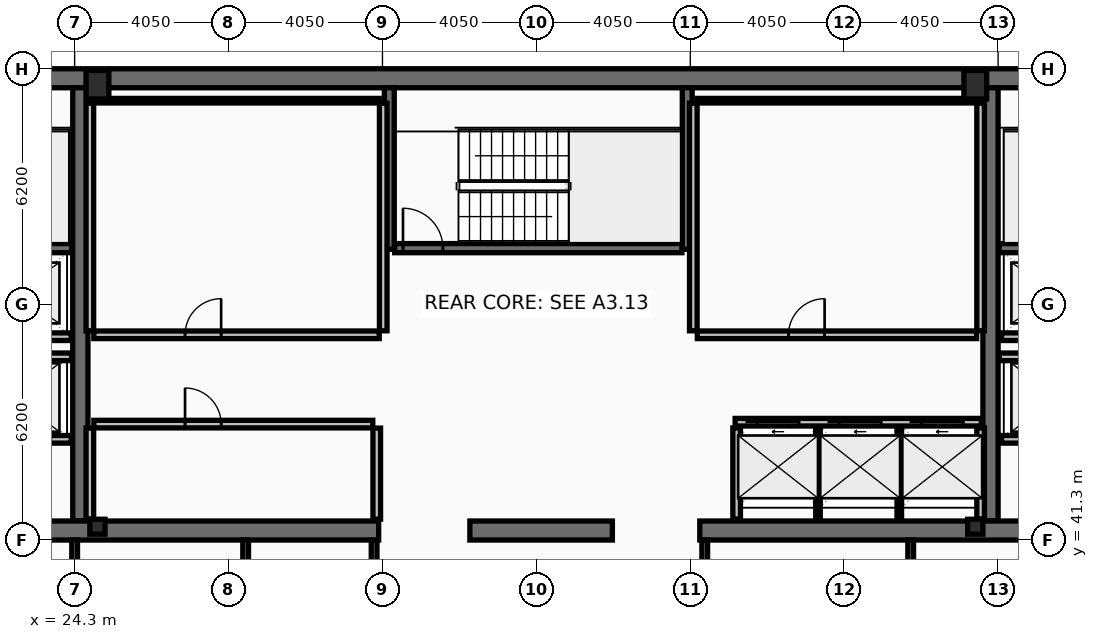
"""IFC4 building model, lengths in metres.
Left out: names, types, materials, properties, quantities, classifications, styles, units other than length and angle.
Written with IfcOpenShell. Run it as: python <this file> out.ifc"""

import sys

from ifc_helpers import new_model, si_unit, direction, frame, frame_2d, origin, origin_2d, place, context, subcontext, project, spatial, rectangle, hollow_rectangle, i_section, extrude, element, fill, save


model = new_model("IFC4")
c1 = context("Model", 3, precision=1e-05, world=origin(), true_north=direction((0.0, 1.0)))
c2 = subcontext(c1, "Body", "Model", "MODEL_VIEW")
j1 = project(units=[si_unit("LENGTHUNIT", "METRE"), si_unit("PLANEANGLEUNIT", "RADIAN")], contexts=[c1])
p1 = place(None, origin())
s1 = spatial("IfcSite", under=j1, at=p1, CompositionType="ELEMENT")
p2 = place(p1, origin())
s2 = spatial("IfcBuilding", under=s1, at=p2, CompositionType="ELEMENT")
p3 = place(p2, frame((0.0, 0.0, 284.2)))
s3 = spatial("IfcBuildingStorey", under=s2, at=p3, CompositionType="ELEMENT", Elevation=284.2)
p4 = place(p3, frame((16.2, 53.45, 0.0), z_axis=(0.0, 0.0, 1.0), x_axis=(1.0, 0.0, 0.0)))
e1 = element("IfcWall", 1, at=p4, inside=s3, PredefinedType="SHEAR", context=c2, shape_type="SweptSolid", body=[
    extrude(rectangle(XDim=40.5, YDim=0.5, at=frame_2d((20.25, 0.0))), origin(), (0.0, 0.0, 1.0), 3.44),
])
for number, where, z_axis, x_axis in (
    (2, (24.45, 41.8, 0.0), (0.0, 0.0, 1.0), (0.0, 1.0, 0.0)),
    (3, (48.4, 41.8, 0.0), (0.0, 0.0, 1.0), (0.0, 1.0, 0.0)),
):
    element("IfcWall", number, at=place(p3, frame(where, z_axis=z_axis, x_axis=x_axis)), inside=s3, PredefinedType="SHEAR", context=c2, shape_type="SweptSolid", body=[
        extrude(rectangle(XDim=11.4, YDim=0.4, at=frame_2d((5.7, 0.0))), origin(), (0.0, 0.0, 1.0), 3.44),
    ])
p5 = place(p3, frame((32.3, 41.55, 0.0), z_axis=(0.0, 0.0, 1.0), x_axis=(-1.0, 0.0, 0.0)))
e4 = element("IfcWall", 4, at=p5, inside=s3, PredefinedType="SHEAR", context=c2, shape_type="SweptSolid", body=[
    extrude(rectangle(XDim=11.45, YDim=0.5, at=frame_2d((5.725, 0.0))), origin(), (0.0, 0.0, 1.0), 3.44),
])
p6 = place(p3, frame((38.45, 41.55, 0.0), z_axis=(0.0, 0.0, 1.0), x_axis=(-1.0, 0.0, 0.0)))
e5 = element("IfcWall", 5, at=p6, inside=s3, PredefinedType="SHEAR", context=c2, shape_type="SweptSolid", body=[
    extrude(rectangle(XDim=3.75, YDim=0.5, at=frame_2d((1.875, 0.0))), origin(), (0.0, 0.0, 1.0), 3.44),
])
p7 = place(p3, frame((52.05, 41.55, 0.0), z_axis=(0.0, 0.0, 1.0), x_axis=(-1.0, 0.0, 0.0)))
e6 = element("IfcWall", 6, at=p7, inside=s3, PredefinedType="SHEAR", context=c2, shape_type="SweptSolid", body=[
    extrude(rectangle(XDim=11.3, YDim=0.5, at=frame_2d((5.65, 0.0))), origin(), (0.0, 0.0, 1.0), 3.44),
])
for number, where, z_axis, x_axis in (
    (7, (32.58, 48.95, 0.0), (0.0, 0.0, 1.0), (0.0, 1.0, 0.0)),
    (8, (40.42, 48.95, 0.0), (0.0, 0.0, 1.0), (0.0, 1.0, 0.0)),
):
    element("IfcWall", number, at=place(p3, frame(where, z_axis=z_axis, x_axis=x_axis)), inside=s3, PredefinedType="SHEAR", context=c2, shape_type="SweptSolid", body=[
        extrude(rectangle(XDim=4.25, YDim=0.26, at=frame_2d((2.125, 0.0))), origin(), (0.0, 0.0, 1.0), 3.44),
    ])
p8 = place(p3, frame((16.7, 48.98, 0.0), z_axis=(0.0, 0.0, 1.0), x_axis=(1.0, 0.0, 0.0)))
e9 = element("IfcWall", 9, at=p8, inside=s3, PredefinedType="SHEAR", context=c2, shape_type="SweptSolid", body=[
    extrude(rectangle(XDim=7.52, YDim=0.24, at=frame_2d((3.76, 0.0))), origin(), (0.0, 0.0, 1.0), 3.44),
])
p9 = place(p8, frame((0.22, 0.0, 0.0)))
e10 = element("IfcOpeningElement", 10, at=p9, cuts=e9, PredefinedType="OPENING", context=c2, shape_type="SweptSolid", body=[
    extrude(rectangle(XDim=1.05, YDim=2.15, at=frame_2d((0.525, 1.075))), frame((0.0, 0.13, 0.0), z_axis=(0.0, -1.0, 0.0), x_axis=(1.0, 0.0, 0.0)), (0.0, 0.0, 1.0), 0.26),
])
p10 = place(p3, frame((48.63, 48.98, 0.0), z_axis=(0.0, 0.0, 1.0), x_axis=(1.0, 0.0, 0.0)))
e11 = element("IfcWall", 11, at=p10, inside=s3, PredefinedType="SHEAR", context=c2, shape_type="SweptSolid", body=[
    extrude(rectangle(XDim=7.57, YDim=0.24, at=frame_2d((3.785, 0.0))), origin(), (0.0, 0.0, 1.0), 3.44),
])
p11 = place(p10, frame((6.3, 0.0, 0.0)))
e12 = element("IfcOpeningElement", 12, at=p11, cuts=e11, PredefinedType="OPENING", context=c2, shape_type="SweptSolid", body=[
    extrude(rectangle(XDim=1.05, YDim=2.15, at=frame_2d((0.525, 1.075))), frame((0.0, 0.13, 0.0), z_axis=(0.0, -1.0, 0.0), x_axis=(1.0, 0.0, 0.0)), (0.0, 0.0, 1.0), 0.26),
])
p12 = place(p3, frame((32.72, 48.98, 0.0), z_axis=(0.0, 0.0, 1.0), x_axis=(1.0, 0.0, 0.0)))
e13 = element("IfcWall", 13, at=p12, inside=s3, PredefinedType="SHEAR", context=c2, shape_type="SweptSolid", body=[
    extrude(rectangle(XDim=7.56, YDim=0.24, at=frame_2d((3.78, 0.0))), origin(), (0.0, 0.0, 1.0), 3.44),
])
p13 = place(p12, frame((0.22, 0.0, 0.0)))
e14 = element("IfcOpeningElement", 14, at=p13, cuts=e13, PredefinedType="OPENING", context=c2, shape_type="SweptSolid", body=[
    extrude(rectangle(XDim=1.05, YDim=2.15, at=frame_2d((0.525, 1.075))), frame((0.0, 0.13, 0.0), z_axis=(0.0, -1.0, 0.0), x_axis=(1.0, 0.0, 0.0)), (0.0, 0.0, 1.0), 0.26),
])
for number, where, z_axis, x_axis in (
    (15, (24.9, 53.28, 0.0), (0.0, 0.0, 1.0), (1.0, 0.0, 0.0)),
    (16, (48.0, 53.28, 0.0), (0.0, 0.0, 1.0), (1.0, 0.0, 0.0)),
):
    element("IfcColumn", number, at=place(p3, frame(where, z_axis=z_axis, x_axis=x_axis)), inside=s3, PredefinedType="COLUMN", context=c2, shape_type="SweptSolid", body=[
        extrude(hollow_rectangle(XDim=0.6, YDim=0.75, WallThickness=0.045, at=origin_2d()), origin(), (0.0, 0.0, 1.0), 3.6),
    ])
for number, where, z_axis, x_axis in (
    (17, (24.9, 41.65, 0.0), (0.0, 0.0, 1.0), (1.0, 0.0, 0.0)),
    (18, (48.0, 41.65, 0.0), (0.0, 0.0, 1.0), (1.0, 0.0, 0.0)),
):
    element("IfcColumn", number, at=place(p3, frame(where, z_axis=z_axis, x_axis=x_axis)), inside=s3, PredefinedType="COLUMN", context=c2, shape_type="SweptSolid", body=[
        extrude(i_section(OverallWidth=0.399, OverallDepth=0.393, WebThickness=0.023, FlangeThickness=0.037, at=origin_2d()), origin(), (0.0, 0.0, 1.0), 3.6),
    ])
p14 = place(p3, frame((41.68, 44.4, 0.0), z_axis=(0.0, 0.0, 1.0), x_axis=(1.0, 0.0, 0.0)))
e19 = element("IfcWall", 19, at=p14, inside=s3, PredefinedType="PARTITIONING", context=c2, shape_type="SweptSolid", body=[
    extrude(rectangle(XDim=6.48, YDim=0.2, at=frame_2d((3.24, 0.0))), origin(), (0.0, 0.0, 1.0), 3.44),
])
p15 = place(p14, frame((0.58, 0.0, 0.0)))
e20 = element("IfcOpeningElement", 20, at=p15, cuts=e19, PredefinedType="OPENING", context=c2, shape_type="SweptSolid", body=[
    extrude(rectangle(XDim=1.1, YDim=2.18, at=frame_2d((0.55, 1.09))), frame((0.0, 0.11, 0.0), z_axis=(0.0, -1.0, 0.0), x_axis=(1.0, 0.0, 0.0)), (0.0, 0.0, 1.0), 0.22),
])
p16 = place(p14, frame((2.74, 0.0, 0.0)))
e21 = element("IfcOpeningElement", 21, at=p16, cuts=e19, PredefinedType="OPENING", context=c2, shape_type="SweptSolid", body=[
    extrude(rectangle(XDim=1.1, YDim=2.18, at=frame_2d((0.55, 1.09))), frame((0.0, 0.11, 0.0), z_axis=(0.0, -1.0, 0.0), x_axis=(1.0, 0.0, 0.0)), (0.0, 0.0, 1.0), 0.22),
])
p17 = place(p14, frame((4.9, 0.0, 0.0)))
e22 = element("IfcOpeningElement", 22, at=p17, cuts=e19, PredefinedType="OPENING", context=c2, shape_type="SweptSolid", body=[
    extrude(rectangle(XDim=1.1, YDim=2.18, at=frame_2d((0.55, 1.09))), frame((0.0, 0.11, 0.0), z_axis=(0.0, -1.0, 0.0), x_axis=(1.0, 0.0, 0.0)), (0.0, 0.0, 1.0), 0.22),
])
p18 = place(p3, frame((51.61, 43.95, 0.0), z_axis=(0.0, 0.0, 1.0), x_axis=(-1.0, 0.0, 0.0)))
e23 = element("IfcWall", 23, at=p18, inside=s3, PredefinedType="PARTITIONING", context=c2, shape_type="SweptSolid", body=[
    extrude(rectangle(XDim=2.92, YDim=0.2, at=frame_2d((1.46, 0.0))), origin(), (0.0, 0.0, 1.0), 3.44),
])
p19 = place(p18, frame((0.81, 0.0, 0.0)))
e24 = element("IfcOpeningElement", 24, at=p19, cuts=e23, PredefinedType="OPENING", context=c2, shape_type="SweptSolid", body=[
    extrude(rectangle(XDim=1.3, YDim=2.18, at=frame_2d((0.65, 1.09))), frame((0.0, 0.11, 0.0), z_axis=(0.0, -1.0, 0.0), x_axis=(1.0, 0.0, 0.0)), (0.0, 0.0, 1.0), 0.22),
])
p20 = place(p3, frame((24.21, 43.95, 0.0), z_axis=(0.0, 0.0, 1.0), x_axis=(-1.0, 0.0, 0.0)))
e25 = element("IfcWall", 25, at=p20, inside=s3, PredefinedType="PARTITIONING", context=c2, shape_type="SweptSolid", body=[
    extrude(rectangle(XDim=2.97, YDim=0.2, at=frame_2d((1.485, 0.0))), origin(), (0.0, 0.0, 1.0), 3.44),
])
p21 = place(p20, frame((0.86, 0.0, 0.0)))
e26 = element("IfcOpeningElement", 26, at=p21, cuts=e25, PredefinedType="OPENING", context=c2, shape_type="SweptSolid", body=[
    extrude(rectangle(XDim=1.3, YDim=2.18, at=frame_2d((0.65, 1.09))), frame((0.0, 0.11, 0.0), z_axis=(0.0, -1.0, 0.0), x_axis=(1.0, 0.0, 0.0)), (0.0, 0.0, 1.0), 0.22),
])
p22 = place(p3, frame((51.61, 46.65, 0.0), z_axis=(0.0, 0.0, 1.0), x_axis=(-1.0, 0.0, 0.0)))
e27 = element("IfcWall", 27, at=p22, inside=s3, PredefinedType="PARTITIONING", context=c2, shape_type="SweptSolid", body=[
    extrude(rectangle(XDim=2.92, YDim=0.2, at=frame_2d((1.46, 0.0))), origin(), (0.0, 0.0, 1.0), 3.44),
])
p23 = place(p22, frame((0.86, 0.0, 0.0)))
e28 = element("IfcOpeningElement", 28, at=p23, cuts=e27, PredefinedType="OPENING", context=c2, shape_type="SweptSolid", body=[
    extrude(rectangle(XDim=1.2, YDim=2.18, at=frame_2d((0.6, 1.09))), frame((0.0, 0.11, 0.0), z_axis=(0.0, -1.0, 0.0), x_axis=(1.0, 0.0, 0.0)), (0.0, 0.0, 1.0), 0.22),
])
p24 = place(p3, frame((24.21, 46.65, 0.0), z_axis=(0.0, 0.0, 1.0), x_axis=(-1.0, 0.0, 0.0)))
e29 = element("IfcWall", 29, at=p24, inside=s3, PredefinedType="PARTITIONING", context=c2, shape_type="SweptSolid", body=[
    extrude(rectangle(XDim=2.97, YDim=0.2, at=frame_2d((1.485, 0.0))), origin(), (0.0, 0.0, 1.0), 3.44),
])
p25 = place(p24, frame((0.91, 0.0, 0.0)))
e30 = element("IfcOpeningElement", 30, at=p25, cuts=e29, PredefinedType="OPENING", context=c2, shape_type="SweptSolid", body=[
    extrude(rectangle(XDim=1.2, YDim=2.18, at=frame_2d((0.6, 1.09))), frame((0.0, 0.11, 0.0), z_axis=(0.0, -1.0, 0.0), x_axis=(1.0, 0.0, 0.0)), (0.0, 0.0, 1.0), 0.22),
])
p26 = place(p3, frame((21.2, 46.12, 0.0), z_axis=(0.0, 0.0, 1.0), x_axis=(1.0, 0.0, 0.0)))
e31 = element("IfcWall", 31, at=p26, inside=s3, PredefinedType="PARTITIONING", context=c2, shape_type="SweptSolid", body=[
    extrude(rectangle(XDim=3.02, YDim=0.2, at=frame_2d((1.51, 0.0))), origin(), (0.0, 0.0, 1.0), 3.44),
])
p27 = place(p3, frame((48.63, 46.12, 0.0), z_axis=(0.0, 0.0, 1.0), x_axis=(1.0, 0.0, 0.0)))
e32 = element("IfcWall", 32, at=p27, inside=s3, PredefinedType="PARTITIONING", context=c2, shape_type="SweptSolid", body=[
    extrude(rectangle(XDim=3.07, YDim=0.2, at=frame_2d((1.535, 0.0))), origin(), (0.0, 0.0, 1.0), 3.44),
])
for number, where, z_axis, x_axis in (
    (33, (24.7, 46.805, 0.0), (0.0, 0.0, 1.0), (0.0, 1.0, 0.0)),
    (34, (32.42, 46.805, 0.0), (0.0, 0.0, 1.0), (0.0, 1.0, 0.0)),
):
    element("IfcWall", number, at=place(p3, frame(where, z_axis=z_axis, x_axis=x_axis)), inside=s3, PredefinedType="PARTITIONING", context=c2, shape_type="SweptSolid", body=[
        extrude(rectangle(XDim=5.99, YDim=0.2, at=frame_2d((2.995, 0.0))), origin(), (0.0, 0.0, 1.0), 3.44),
    ])
p28 = place(p3, frame((24.805, 52.86, 0.0), z_axis=(0.0, 0.0, 1.0), x_axis=(1.0, 0.0, 0.0)))
e35 = element("IfcWall", 35, at=p28, inside=s3, PredefinedType="PARTITIONING", context=c2, shape_type="SweptSolid", body=[
    extrude(rectangle(XDim=7.51, YDim=0.12, at=frame_2d((3.755, 0.0))), origin(), (0.0, 0.0, 1.0), 3.44),
])
p29 = place(p3, frame((24.805, 46.7, 0.0), z_axis=(0.0, 0.0, 1.0), x_axis=(1.0, 0.0, 0.0)))
e36 = element("IfcWall", 36, at=p29, inside=s3, PredefinedType="PARTITIONING", context=c2, shape_type="SweptSolid", body=[
    extrude(rectangle(XDim=7.51, YDim=0.2, at=frame_2d((3.755, 0.0))), origin(), (0.0, 0.0, 1.0), 3.44),
])
p30 = place(p29, frame((2.4, 0.0, 0.0)))
e37 = element("IfcOpeningElement", 37, at=p30, cuts=e36, PredefinedType="OPENING", context=c2, shape_type="SweptSolid", body=[
    extrude(rectangle(XDim=0.95, YDim=2.1, at=frame_2d((0.475, 1.05))), frame((0.0, 0.11, 0.0), z_axis=(0.0, -1.0, 0.0), x_axis=(1.0, 0.0, 0.0)), (0.0, 0.0, 1.0), 0.22),
])
for number, where, z_axis, x_axis in (
    (38, (24.7, 41.85, 0.0), (0.0, 0.0, 1.0), (0.0, 1.0, 0.0)),
    (39, (32.25, 41.85, 0.0), (0.0, 0.0, 1.0), (0.0, 1.0, 0.0)),
):
    element("IfcWall", number, at=place(p3, frame(where, z_axis=z_axis, x_axis=x_axis)), inside=s3, PredefinedType="PARTITIONING", context=c2, shape_type="SweptSolid", body=[
        extrude(rectangle(XDim=2.395, YDim=0.2, at=frame_2d((1.198, 0.0))), origin(), (0.0, 0.0, 1.0), 3.44),
    ])
p31 = place(p3, frame((24.805, 44.35, 0.0), z_axis=(0.0, 0.0, 1.0), x_axis=(1.0, 0.0, 0.0)))
e40 = element("IfcWall", 40, at=p31, inside=s3, PredefinedType="PARTITIONING", context=c2, shape_type="SweptSolid", body=[
    extrude(rectangle(XDim=7.34, YDim=0.2, at=frame_2d((3.67, 0.0))), origin(), (0.0, 0.0, 1.0), 3.44),
])
p32 = place(p31, frame((2.4, 0.0, 0.0)))
e41 = element("IfcOpeningElement", 41, at=p32, cuts=e40, PredefinedType="OPENING", context=c2, shape_type="SweptSolid", body=[
    extrude(rectangle(XDim=0.95, YDim=2.1, at=frame_2d((0.475, 1.05))), frame((0.0, 0.11, 0.0), z_axis=(0.0, -1.0, 0.0), x_axis=(1.0, 0.0, 0.0)), (0.0, 0.0, 1.0), 0.22),
])
for number, where, z_axis, x_axis in (
    (42, (40.58, 46.805, 0.0), (0.0, 0.0, 1.0), (0.0, 1.0, 0.0)),
    (43, (48.14, 46.805, 0.0), (0.0, 0.0, 1.0), (0.0, 1.0, 0.0)),
):
    element("IfcWall", number, at=place(p3, frame(where, z_axis=z_axis, x_axis=x_axis)), inside=s3, PredefinedType="PARTITIONING", context=c2, shape_type="SweptSolid", body=[
        extrude(rectangle(XDim=5.99, YDim=0.2, at=frame_2d((2.995, 0.0))), origin(), (0.0, 0.0, 1.0), 3.44),
    ])
p33 = place(p3, frame((40.685, 52.86, 0.0), z_axis=(0.0, 0.0, 1.0), x_axis=(1.0, 0.0, 0.0)))
e44 = element("IfcWall", 44, at=p33, inside=s3, PredefinedType="PARTITIONING", context=c2, shape_type="SweptSolid", body=[
    extrude(rectangle(XDim=7.35, YDim=0.12, at=frame_2d((3.675, 0.0))), origin(), (0.0, 0.0, 1.0), 3.44),
])
p34 = place(p3, frame((40.685, 46.7, 0.0), z_axis=(0.0, 0.0, 1.0), x_axis=(1.0, 0.0, 0.0)))
e45 = element("IfcWall", 45, at=p34, inside=s3, PredefinedType="PARTITIONING", context=c2, shape_type="SweptSolid", body=[
    extrude(rectangle(XDim=7.35, YDim=0.2, at=frame_2d((3.675, 0.0))), origin(), (0.0, 0.0, 1.0), 3.44),
])
p35 = place(p34, frame((2.4, 0.0, 0.0)))
e46 = element("IfcOpeningElement", 46, at=p35, cuts=e45, PredefinedType="OPENING", context=c2, shape_type="SweptSolid", body=[
    extrude(rectangle(XDim=0.95, YDim=2.1, at=frame_2d((0.475, 1.05))), frame((0.0, 0.11, 0.0), z_axis=(0.0, -1.0, 0.0), x_axis=(1.0, 0.0, 0.0)), (0.0, 0.0, 1.0), 0.22),
])
for number, where, z_axis, x_axis in (
    (47, (41.72, 41.85, 0.0), (0.0, 0.0, 1.0), (0.0, 1.0, 0.0)),
    (48, (48.14, 41.85, 0.0), (0.0, 0.0, 1.0), (0.0, 1.0, 0.0)),
):
    element("IfcWall", number, at=place(p3, frame(where, z_axis=z_axis, x_axis=x_axis)), inside=s3, PredefinedType="PARTITIONING", context=c2, shape_type="SweptSolid", body=[
        extrude(rectangle(XDim=2.4, YDim=0.2, at=frame_2d((1.2, 0.0))), origin(), (0.0, 0.0, 1.0), 3.44),
    ])
for number, where, z_axis, x_axis in (
    (49, (43.86, 41.85, 0.0), (0.0, 0.0, 1.0), (0.0, 1.0, 0.0)),
    (50, (46.0, 41.85, 0.0), (0.0, 0.0, 1.0), (0.0, 1.0, 0.0)),
):
    element("IfcWall", number, at=place(p3, frame(where, z_axis=z_axis, x_axis=x_axis)), inside=s3, PredefinedType="PARTITIONING", context=c2, shape_type="SweptSolid", body=[
        extrude(rectangle(XDim=2.4, YDim=0.12, at=frame_2d((1.2, 0.0))), origin(), (0.0, 0.0, 1.0), 3.44),
    ])
for number, where, z_axis, x_axis in (
    (51, (24.3, 38.28, 0.0), (0.0, 0.0, 1.0), (0.0, 1.0, 0.0)),
    (52, (28.8, 38.28, 0.0), (0.0, 0.0, 1.0), (0.0, 1.0, 0.0)),
    (53, (32.18, 38.28, 0.0), (0.0, 0.0, 1.0), (0.0, 1.0, 0.0)),
    (54, (40.88, 38.28, 0.0), (0.0, 0.0, 1.0), (0.0, 1.0, 0.0)),
    (55, (46.3, 38.28, 0.0), (0.0, 0.0, 1.0), (0.0, 1.0, 0.0)),
):
    element("IfcWall", number, at=place(p3, frame(where, z_axis=z_axis, x_axis=x_axis)), inside=s3, PredefinedType="PARTITIONING", context=c2, shape_type="SweptSolid", body=[
        extrude(rectangle(XDim=3.02, YDim=0.15, at=frame_2d((1.51, 0.0))), origin(), (0.0, 0.0, 1.0), 3.44),
    ])
p36 = place(p13, origin())
e56 = element("IfcDoor", 56, at=p36, inside=s3, OperationType="SINGLE_SWING_LEFT", PredefinedType="DOOR", context=c2, shape_type="SweptSolid", body=[
    extrude(rectangle(XDim=1.05, YDim=2.15, at=frame_2d((0.525, 1.075))), frame((0.0, 0.025, 0.0), z_axis=(0.0, -1.0, 0.0), x_axis=(1.0, 0.0, 0.0)), (0.0, 0.0, 1.0), 0.05),
])
fill(e14, e56)
p37 = place(p15, origin())
e57 = element("IfcDoor", 57, at=p37, inside=s3, OperationType="SLIDING_TO_LEFT", PredefinedType="DOOR", context=c2, shape_type="SweptSolid", body=[
    extrude(rectangle(XDim=1.1, YDim=2.18, at=frame_2d((0.55, 1.09))), frame((0.0, 0.025, 0.0), z_axis=(0.0, -1.0, 0.0), x_axis=(1.0, 0.0, 0.0)), (0.0, 0.0, 1.0), 0.05),
])
fill(e20, e57)
p38 = place(p16, origin())
e58 = element("IfcDoor", 58, at=p38, inside=s3, OperationType="SLIDING_TO_LEFT", PredefinedType="DOOR", context=c2, shape_type="SweptSolid", body=[
    extrude(rectangle(XDim=1.1, YDim=2.18, at=frame_2d((0.55, 1.09))), frame((0.0, 0.025, 0.0), z_axis=(0.0, -1.0, 0.0), x_axis=(1.0, 0.0, 0.0)), (0.0, 0.0, 1.0), 0.05),
])
fill(e21, e58)
p39 = place(p17, origin())
e59 = element("IfcDoor", 59, at=p39, inside=s3, OperationType="SLIDING_TO_LEFT", PredefinedType="DOOR", context=c2, shape_type="SweptSolid", body=[
    extrude(rectangle(XDim=1.1, YDim=2.18, at=frame_2d((0.55, 1.09))), frame((0.0, 0.025, 0.0), z_axis=(0.0, -1.0, 0.0), x_axis=(1.0, 0.0, 0.0)), (0.0, 0.0, 1.0), 0.05),
])
fill(e22, e59)
p40 = place(p30, origin())
e60 = element("IfcDoor", 60, at=p40, inside=s3, OperationType="SINGLE_SWING_RIGHT", PredefinedType="DOOR", context=c2, shape_type="SweptSolid", body=[
    extrude(rectangle(XDim=0.95, YDim=2.1, at=frame_2d((0.475, 1.05))), frame((0.0, 0.025, 0.0), z_axis=(0.0, -1.0, 0.0), x_axis=(1.0, 0.0, 0.0)), (0.0, 0.0, 1.0), 0.05),
])
fill(e37, e60)
p41 = place(p32, origin())
e61 = element("IfcDoor", 61, at=p41, inside=s3, OperationType="SINGLE_SWING_LEFT", PredefinedType="DOOR", context=c2, shape_type="SweptSolid", body=[
    extrude(rectangle(XDim=0.95, YDim=2.1, at=frame_2d((0.475, 1.05))), frame((0.0, 0.025, 0.0), z_axis=(0.0, -1.0, 0.0), x_axis=(1.0, 0.0, 0.0)), (0.0, 0.0, 1.0), 0.05),
])
fill(e41, e61)
p42 = place(p35, origin())
e62 = element("IfcDoor", 62, at=p42, inside=s3, OperationType="SINGLE_SWING_RIGHT", PredefinedType="DOOR", context=c2, shape_type="SweptSolid", body=[
    extrude(rectangle(XDim=0.95, YDim=2.1, at=frame_2d((0.475, 1.05))), frame((0.0, 0.025, 0.0), z_axis=(0.0, -1.0, 0.0), x_axis=(1.0, 0.0, 0.0)), (0.0, 0.0, 1.0), 0.05),
])
fill(e46, e62)
save(model, sys.argv[1])
